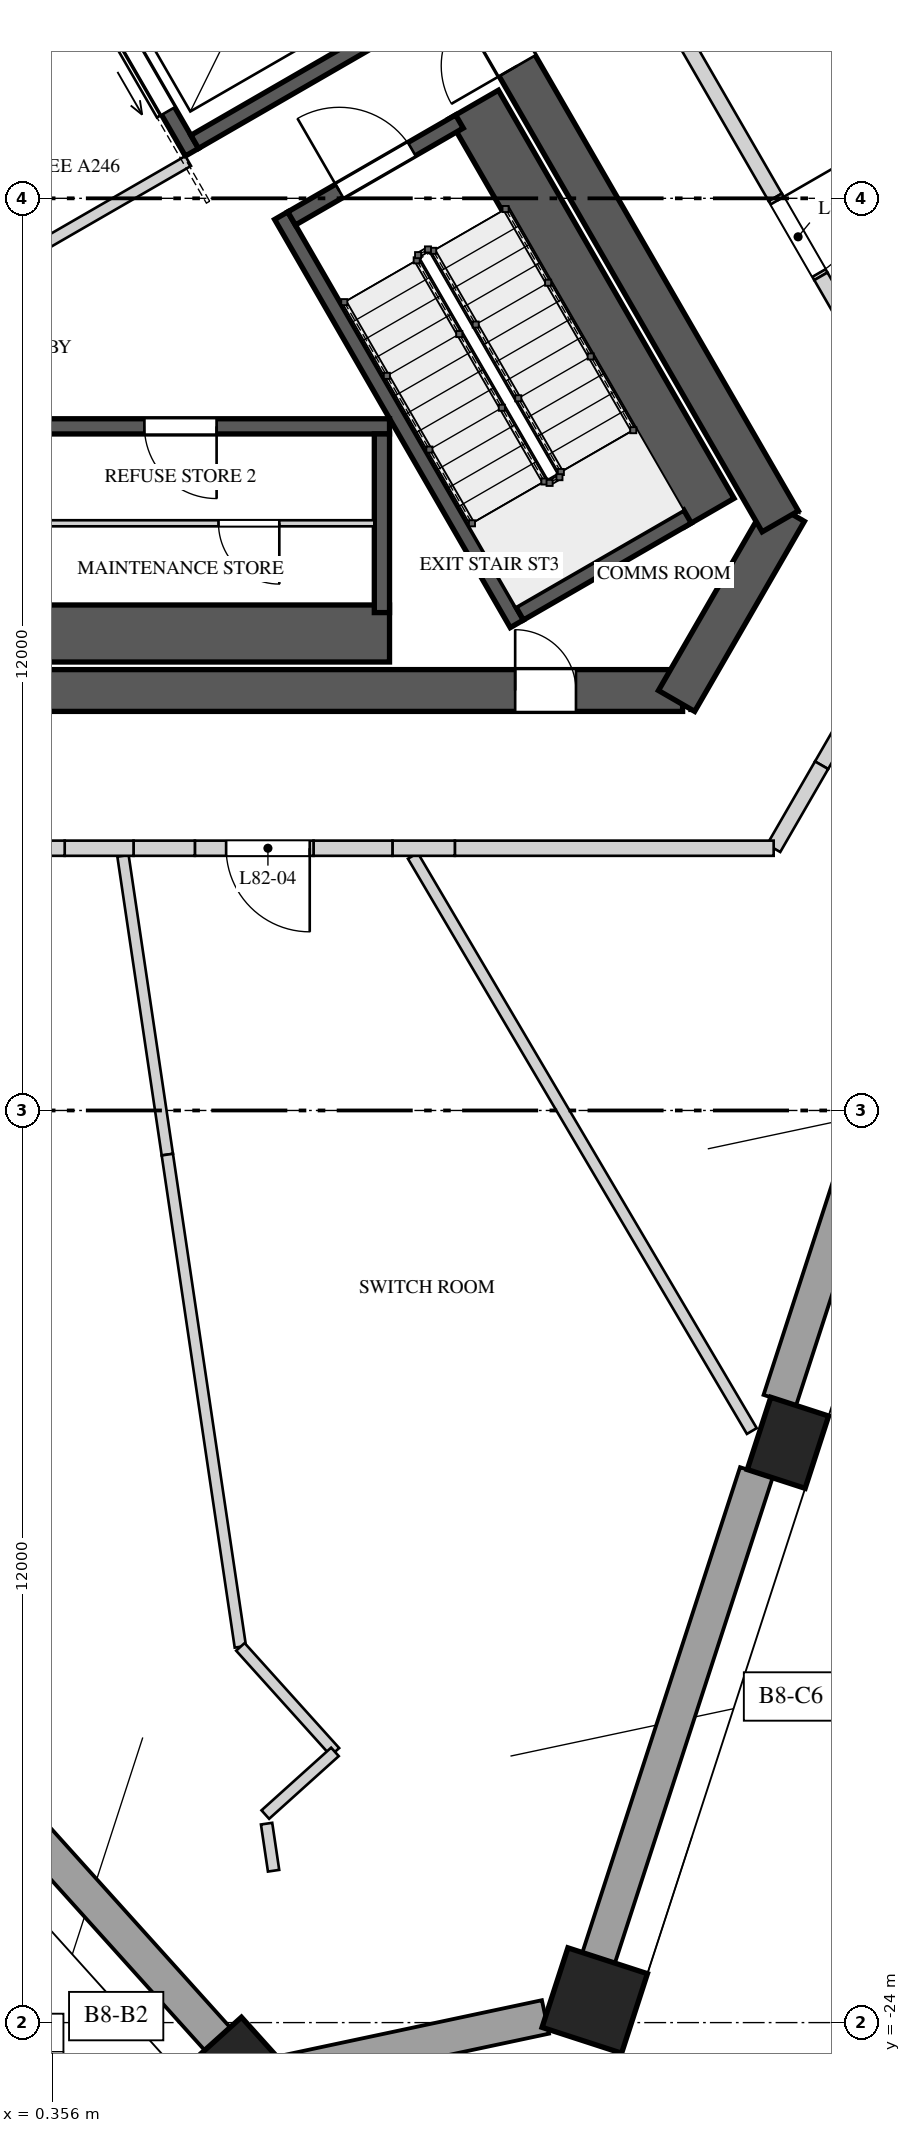
"""IFC4 building model, lengths in metres.
Left out: names, types, materials, properties, quantities, classifications, styles, units other than length and angle.
Written with IfcOpenShell. Run it as: python <this file> out.ifc"""

import sys

from ifc_helpers import new_model, si_unit, direction, frame, frame_2d, origin, origin_2d, place, context, subcontext, project, spatial, polyline, rectangle, outline, extrude, element, fill, save


model = new_model("IFC4")
c1 = context("Model", 3, precision=1e-05, world=origin(), true_north=direction((0.0, 1.0)))
c2 = subcontext(c1, "Body", "Model", "MODEL_VIEW")
j1 = project(units=[si_unit("LENGTHUNIT", "METRE"), si_unit("PLANEANGLEUNIT", "RADIAN")], contexts=[c1])
p1 = place(None, origin())
s1 = spatial("IfcSite", under=j1, at=p1, CompositionType="ELEMENT")
p2 = place(p1, origin())
s2 = spatial("IfcBuilding", under=s1, at=p2, CompositionType="ELEMENT")
p3 = place(p2, frame((0.0, 0.0, 356.9)))
s3 = spatial("IfcBuildingStorey", under=s2, at=p3, CompositionType="ELEMENT", Elevation=356.9)
p4 = place(p3, frame((-8.646, -6.475, 0.0), z_axis=(0.0, 0.0, 1.0), x_axis=(1.0, 0.0, 0.0)))
e1 = element("IfcWall", 1, at=p4, inside=s3, PredefinedType="SHEAR", context=c2, shape_type="SweptSolid", body=[
    extrude(rectangle(XDim=17.292, YDim=0.55, at=frame_2d((8.646, 0.0))), origin(), (0.0, 0.0, 1.0), 4.5),
])
p5 = place(p4, frame((6.851, 0.0, 0.0)))
e2 = element("IfcOpeningElement", 2, at=p5, cuts=e1, PredefinedType="OPENING", context=c2, shape_type="SweptSolid", body=[
    extrude(rectangle(XDim=1.0, YDim=2.4, at=frame_2d((0.5, 1.2))), frame((0.0, 0.285, 0.0), z_axis=(0.0, -1.0, 0.0), x_axis=(1.0, 0.0, 0.0)), (0.0, 0.0, 1.0), 0.57),
])
p6 = place(p4, frame((15.089, 0.0, 0.0)))
e3 = element("IfcOpeningElement", 3, at=p6, cuts=e1, PredefinedType="OPENING", context=c2, shape_type="SweptSolid", body=[
    extrude(rectangle(XDim=0.8, YDim=2.1, at=frame_2d((0.4, 1.05))), frame((0.0, 0.285, 0.0), z_axis=(0.0, -1.0, 0.0), x_axis=(1.0, 0.0, 0.0)), (0.0, 0.0, 1.0), 0.57),
])
p7 = place(p3, frame((8.566, -6.613, 0.0), z_axis=(0.0, 0.0, 1.0), x_axis=(0.499995765644, 0.866027848477, 0.0)))
e4 = element("IfcWall", 4, at=p7, inside=s3, PredefinedType="SHEAR", context=c2, shape_type="SweptSolid", body=[
    extrude(rectangle(XDim=2.887, YDim=0.55, at=frame_2d((1.443, 0.0))), origin(), (0.0, 0.0, 1.0), 4.5),
])
p8 = place(p3, frame((9.93, -4.25, 0.0), z_axis=(0.0, 0.0, 1.0), x_axis=(-0.499994590896, 0.86602852671, 0.0)))
e5 = element("IfcWall", 5, at=p8, inside=s3, PredefinedType="SHEAR", context=c2, shape_type="SweptSolid", body=[
    extrude(rectangle(XDim=17.292, YDim=0.55, at=frame_2d((8.646, 0.0))), origin(), (0.0, 0.0, 1.0), 4.5),
])
p9 = place(p8, frame((6.921, 0.0, 0.0)))
e6 = element("IfcOpeningElement", 6, at=p9, cuts=e5, PredefinedType="OPENING", context=c2, shape_type="SweptSolid", body=[
    extrude(rectangle(XDim=1.0, YDim=2.4, at=frame_2d((0.5, 1.2))), frame((0.0, 0.285, 0.0), z_axis=(0.0, -1.0, 0.0), x_axis=(1.0, 0.0, 0.0)), (0.0, 0.0, 1.0), 0.57),
])
for number, where, z_axis, x_axis in (
    (7, (2.801, -24.706, 0.0), (0.0, 0.0, 1.0), (0.669, -0.743, 0.0)),
    (8, (7.49, -23.709, 0.0), (0.0, 0.0, 1.0), (0.309, 0.951, 0.0)),
):
    element("IfcColumn", number, at=place(p3, frame(where, z_axis=z_axis, x_axis=x_axis)), inside=s3, PredefinedType="COLUMN", context=c2, shape_type="SweptSolid", body=[
        extrude(rectangle(XDim=1.1, YDim=1.1, at=origin_2d()), origin(), (0.0, 0.0, 1.0), 4.5),
    ])
p10 = place(p3, frame((10.032, -16.372, 0.0), z_axis=(0.0, 0.0, 1.0), x_axis=(0.309016994375, 0.951056516295, 0.0)))
e9 = element("IfcColumn", 9, at=p10, inside=s3, PredefinedType="COLUMN", context=c2, shape_type="SweptSolid", body=[
    extrude(rectangle(XDim=1.0, YDim=0.8, at=origin_2d()), origin(), (0.0, 0.0, 1.0), 4.5),
])
p11 = place(p3, frame((-1.966, -19.224, 0.0), z_axis=(0.0, 0.0, 1.0), x_axis=(0.66911941145, -0.743154905266, 0.0)))
e10 = element("IfcWall", 10, at=p11, inside=s3, PredefinedType="SOLIDWALL", context=c2, shape_type="SweptSolid", body=[
    extrude(rectangle(XDim=6.714, YDim=0.45, at=frame_2d((3.357, 0.0))), origin(), (0.0, 0.0, 1.0), 3.8),
])
p12 = place(p3, frame((3.481, -24.64, 0.0), z_axis=(0.0, 0.0, 1.0), x_axis=(0.978139158523, 0.207951404333, 0.0)))
e11 = element("IfcWall", 11, at=p12, inside=s3, PredefinedType="SOLIDWALL", context=c2, shape_type="SweptSolid", body=[
    extrude(rectangle(XDim=3.435, YDim=0.45, at=frame_2d((1.718, 0.0))), origin(), (0.0, 0.0, 1.0), 3.8),
])
p13 = place(p3, frame((7.541, -23.148, 0.0), z_axis=(0.0, 0.0, 1.0), x_axis=(0.309018647645, 0.951055979114, 0.0)))
e12 = element("IfcWall", 12, at=p13, inside=s3, PredefinedType="SOLIDWALL", context=c2, shape_type="SweptSolid", body=[
    extrude(rectangle(XDim=6.714, YDim=0.45, at=frame_2d((3.357, 0.0))), origin(), (0.0, 0.0, 1.0), 3.8),
])
p14 = place(p3, frame((9.925, -15.812, 0.0), z_axis=(0.0, 0.0, 1.0), x_axis=(0.309008326872, 0.951059332494, 0.0)))
e13 = element("IfcWall", 13, at=p14, inside=s3, PredefinedType="SOLIDWALL", context=c2, shape_type="SweptSolid", body=[
    extrude(rectangle(XDim=7.314, YDim=0.45, at=frame_2d((3.657, 0.0))), origin(), (0.0, 0.0, 1.0), 3.8),
])
p15 = place(p3, frame((8.998, -4.135, 0.0), z_axis=(0.0, 0.0, 1.0), x_axis=(-0.500009909098, 0.866019682689, 0.0)))
e14 = element("IfcWall", 14, at=p15, inside=s3, PredefinedType="SOLIDWALL", context=c2, shape_type="SweptSolid", body=[
    extrude(rectangle(XDim=6.2, YDim=0.75, at=frame_2d((3.1, 0.0))), origin(), (0.0, 0.0, 1.0), 4.15),
])
p16 = place(p3, frame((6.465, -5.597, 0.0), z_axis=(0.0, 0.0, 1.0), x_axis=(-0.49998037582, 0.866036733513, 0.0)))
e15 = element("IfcWall", 15, at=p16, inside=s3, PredefinedType="SOLIDWALL", context=c2, shape_type="SweptSolid", body=[
    extrude(rectangle(XDim=6.2, YDim=0.2, at=frame_2d((3.1, 0.0))), origin(), (0.0, 0.0, 1.0), 4.15),
])
p17 = place(p3, frame((6.501, -5.461, 0.0), z_axis=(0.0, 0.0, 1.0), x_axis=(0.865989465428, 0.500062241894, 0.0)))
e16 = element("IfcWall", 16, at=p17, inside=s3, PredefinedType="SOLIDWALL", context=c2, shape_type="SweptSolid", body=[
    extrude(rectangle(XDim=2.55, YDim=0.2, at=frame_2d((1.275, 0.0))), origin(), (0.0, 0.0, 1.0), 4.15),
])
p18 = place(p3, frame((3.501, -0.265, 0.0), z_axis=(0.0, 0.0, 1.0), x_axis=(0.866030925526, 0.499990435942, 0.0)))
e17 = element("IfcWall", 17, at=p18, inside=s3, PredefinedType="SOLIDWALL", context=c2, shape_type="SweptSolid", body=[
    extrude(rectangle(XDim=2.55, YDim=0.2, at=frame_2d((1.275, 0.0))), origin(), (0.0, 0.0, 1.0), 4.15),
])
p19 = place(p18, frame((0.725, 0.0, 0.0)))
e18 = element("IfcOpeningElement", 18, at=p19, cuts=e17, PredefinedType="OPENING", context=c2, shape_type="SweptSolid", body=[
    extrude(rectangle(XDim=1.1, YDim=2.4, at=frame_2d((0.55, 1.2))), frame((0.0, 0.11, 0.0), z_axis=(0.0, -1.0, 0.0), x_axis=(1.0, 0.0, 0.0)), (0.0, 0.0, 1.0), 0.22),
])
p20 = place(p3, frame((4.79, -3.0, 0.0), z_axis=(0.0, 0.0, 1.0), x_axis=(-1.0, 0.0, 0.0)))
e19 = element("IfcWall", 19, at=p20, inside=s3, PredefinedType="SOLIDWALL", context=c2, shape_type="SweptSolid", body=[
    extrude(rectangle(XDim=5.5, YDim=0.2, at=frame_2d((2.75, 0.0))), origin(), (0.0, 0.0, 1.0), 4.15),
])
p21 = place(p20, frame((2.275, 0.0, 0.0)))
e20 = element("IfcOpeningElement", 20, at=p21, cuts=e19, PredefinedType="OPENING", context=c2, shape_type="SweptSolid", body=[
    extrude(rectangle(XDim=0.95, YDim=2.4, at=frame_2d((0.475, 1.2))), frame((0.0, 0.11, 0.0), z_axis=(0.0, -1.0, 0.0), x_axis=(1.0, 0.0, 0.0)), (0.0, 0.0, 1.0), 0.22),
])
p22 = place(p3, frame((-0.71, -5.725, 0.0), z_axis=(0.0, 0.0, 1.0), x_axis=(1.0, 0.0, 0.0)))
e21 = element("IfcWall", 21, at=p22, inside=s3, PredefinedType="SOLIDWALL", context=c2, shape_type="SweptSolid", body=[
    extrude(rectangle(XDim=5.5, YDim=0.75, at=frame_2d((2.75, 0.0))), origin(), (0.0, 0.0, 1.0), 4.15),
])
p23 = place(p3, frame((4.69, -3.1, 0.0), z_axis=(0.0, 0.0, 1.0), x_axis=(0.0, -1.0, 0.0)))
e22 = element("IfcWall", 22, at=p23, inside=s3, PredefinedType="SOLIDWALL", context=c2, shape_type="SweptSolid", body=[
    extrude(rectangle(XDim=2.35, YDim=0.2, at=frame_2d((1.175, 0.0))), origin(), (0.0, 0.0, 1.0), 4.15),
])
p24 = place(p3, frame((4.59, -4.275, 0.0), z_axis=(0.0, 0.0, 1.0), x_axis=(-1.0, 0.0, 0.0)))
e23 = element("IfcWall", 23, at=p24, inside=s3, PredefinedType="PARTITIONING", context=c2, shape_type="SweptSolid", body=[
    extrude(rectangle(XDim=5.1, YDim=0.08, at=frame_2d((2.55, 0.0))), origin(), (0.0, 0.0, 1.0), 4.15),
])
p25 = place(p24, frame((1.25, 0.0, 0.0)))
e24 = element("IfcOpeningElement", 24, at=p25, cuts=e23, PredefinedType="OPENING", context=c2, shape_type="SweptSolid", body=[
    extrude(rectangle(XDim=0.8, YDim=2.1, at=frame_2d((0.4, 1.05))), frame((0.0, 0.05, 0.0), z_axis=(0.0, -1.0, 0.0), x_axis=(1.0, 0.0, 0.0)), (0.0, 0.0, 1.0), 0.1),
])
p26 = place(p3, frame((2.19, 0.606, 0.0), z_axis=(0.0, 0.0, 1.0), x_axis=(-0.500002801628, 0.866023786258, 0.0)))
e25 = element("IfcWall", 25, at=p26, inside=s3, PredefinedType="SOLIDWALL", context=c2, shape_type="SweptSolid", body=[
    extrude(rectangle(XDim=4.9, YDim=0.2, at=frame_2d((2.45, 0.0))), origin(), (0.0, 0.0, 1.0), 4.15),
])
p27 = place(p26, frame((0.625, 0.0, 0.0)))
e26 = element("IfcOpeningElement", 26, at=p27, cuts=e25, PredefinedType="OPENING", context=c2, shape_type="SweptSolid", body=[
    extrude(rectangle(XDim=1.3, YDim=2.1, at=frame_2d((0.65, 1.05))), frame((0.0, 0.11, 0.0), z_axis=(0.0, -1.0, 0.0), x_axis=(1.0, 0.0, 0.0)), (0.0, 0.0, 1.0), 0.22),
])
p28 = place(p26, frame((2.975, 0.0, 0.0)))
e27 = element("IfcOpeningElement", 27, at=p28, cuts=e25, PredefinedType="OPENING", context=c2, shape_type="SweptSolid", body=[
    extrude(rectangle(XDim=1.3, YDim=2.1, at=frame_2d((0.65, 1.05))), frame((0.0, 0.11, 0.0), z_axis=(0.0, -1.0, 0.0), x_axis=(1.0, 0.0, 0.0)), (0.0, 0.0, 1.0), 0.22),
])
p29 = place(p3, frame((2.227, 0.743, 0.0), z_axis=(0.0, 0.0, 1.0), x_axis=(0.866035871367, 0.499981869177, 0.0)))
e28 = element("IfcWall", 28, at=p29, inside=s3, PredefinedType="SOLIDWALL", context=c2, shape_type="SweptSolid", body=[
    extrude(rectangle(XDim=3.15, YDim=0.2, at=frame_2d((1.575, 0.0))), origin(), (0.0, 0.0, 1.0), 4.15),
])
p30 = place(p3, frame((-0.717, -1.159, 0.0), z_axis=(0.0, 0.0, 1.0), x_axis=(0.866008176907, 0.50002983664, 0.0)))
e29 = element("IfcWall", 29, at=p30, inside=s3, PredefinedType="PARTITIONING", context=c2, shape_type="SweptSolid", body=[
    extrude(rectangle(XDim=3.3, YDim=0.15, at=frame_2d((1.65, 0.0))), origin(), (0.0, 0.0, 1.0), 4.15),
])
p31 = place(p3, frame((1.283, -8.65, 0.0), z_axis=(0.0, 0.0, 1.0), x_axis=(0.146778002289, -0.98916945871, 0.0)))
e30 = element("IfcWall", 30, at=p31, inside=s3, PredefinedType="PARTITIONING", context=c2, shape_type="SweptSolid", body=[
    extrude(rectangle(XDim=3.974, YDim=0.15, at=frame_2d((1.987, 0.0))), origin(), (0.0, 0.0, 1.0), 3.05),
])
p32 = place(p3, frame((1.867, -12.581, 0.0), z_axis=(0.0, 0.0, 1.0), x_axis=(0.146760871061, -0.989172000577, 0.0)))
e31 = element("IfcWall", 31, at=p32, inside=s3, PredefinedType="PARTITIONING", context=c2, shape_type="SweptSolid", body=[
    extrude(rectangle(XDim=6.546, YDim=0.15, at=frame_2d((3.273, 0.0))), origin(), (0.0, 0.0, 1.0), 4.15),
])
p33 = place(p3, frame((2.828, -19.057, 0.0), z_axis=(0.0, 0.0, 1.0), x_axis=(0.66910257544, -0.743170063673, 0.0)))
e32 = element("IfcWall", 32, at=p33, inside=s3, PredefinedType="PARTITIONING", context=c2, shape_type="SweptSolid", body=[
    extrude(rectangle(XDim=1.859, YDim=0.15, at=frame_2d((0.93, 0.0))), origin(), (0.0, 0.0, 1.0), 4.15),
])
p34 = place(p3, frame((3.173, -21.383, 0.0), z_axis=(0.0, 0.0, 1.0), x_axis=(0.146986678694, -0.989138471745, 0.0)))
e33 = element("IfcWall", 33, at=p34, inside=s3, PredefinedType="PARTITIONING", context=c2, shape_type="SweptSolid", body=[
    extrude(rectangle(XDim=0.626, YDim=0.15, at=frame_2d((0.313, 0.0))), origin(), (0.0, 0.0, 1.0), 4.15),
])
p35 = place(p3, frame((4.072, -20.438, 0.0), z_axis=(0.0, 0.0, 1.0), x_axis=(-0.74317594648, -0.669096041367, 0.0)))
e34 = element("IfcWall", 34, at=p35, inside=s3, PredefinedType="PARTITIONING", context=c2, shape_type="SweptSolid", body=[
    extrude(rectangle(XDim=1.233, YDim=0.15, at=frame_2d((0.616, 0.0))), origin(), (0.0, 0.0, 1.0), 4.15),
])
p36 = place(p3, frame((5.097, -8.65, 0.0), z_axis=(0.0, 0.0, 1.0), x_axis=(0.507661360347, -0.861556697618, 0.0)))
e35 = element("IfcWall", 35, at=p36, inside=s3, PredefinedType="PARTITIONING", context=c2, shape_type="SweptSolid", body=[
    extrude(rectangle(XDim=8.783, YDim=0.15, at=frame_2d((4.392, 0.0))), origin(), (0.0, 0.0, 1.0), 3.45),
])
p37 = place(p3, frame((10.825, -6.851, 0.0), z_axis=(0.0, 0.0, 1.0), x_axis=(-0.500144223137, -0.865942120504, 0.0)))
e36 = element("IfcWall", 36, at=p37, inside=s3, PredefinedType="SOLIDWALL", context=c2, shape_type="SweptSolid", body=[
    extrude(rectangle(XDim=0.701, YDim=0.2, at=frame_2d((0.351, 0.0))), origin(), (0.0, 0.0, 1.0), 3.45),
])
p38 = place(p3, frame((10.474, -7.458, 0.0), z_axis=(0.0, 0.0, 1.0), x_axis=(-0.499929168788, -0.866066294342, 0.0)))
e37 = element("IfcWall", 37, at=p38, inside=s3, PredefinedType="SOLIDWALL", context=c2, shape_type="SweptSolid", body=[
    extrude(rectangle(XDim=1.261, YDim=0.2, at=frame_2d((0.63, 0.0))), origin(), (0.0, 0.0, 1.0), 4.15),
])
p39 = place(p3, frame((9.844, -8.55, 0.0), z_axis=(0.0, 0.0, 1.0), x_axis=(-1.0, 0.0, 0.0)))
e38 = element("IfcWall", 38, at=p39, inside=s3, PredefinedType="SOLIDWALL", context=c2, shape_type="SweptSolid", body=[
    extrude(rectangle(XDim=4.194, YDim=0.2, at=frame_2d((2.097, 0.0))), origin(), (0.0, 0.0, 1.0), 4.15),
])
p40 = place(p3, frame((5.649, -8.55, 0.0), z_axis=(0.0, 0.0, 1.0), x_axis=(-1.0, 0.0, 0.0)))
e39 = element("IfcWall", 39, at=p40, inside=s3, PredefinedType="SOLIDWALL", context=c2, shape_type="SweptSolid", body=[
    extrude(rectangle(XDim=0.821, YDim=0.2, at=frame_2d((0.411, 0.0))), origin(), (0.0, 0.0, 1.0), 3.45),
])
p41 = place(p3, frame((4.828, -8.55, 0.0), z_axis=(0.0, 0.0, 1.0), x_axis=(-1.0, 0.0, 0.0)))
e40 = element("IfcWall", 40, at=p41, inside=s3, PredefinedType="SOLIDWALL", context=c2, shape_type="SweptSolid", body=[
    extrude(rectangle(XDim=1.038, YDim=0.2, at=frame_2d((0.519, 0.0))), origin(), (0.0, 0.0, 1.0), 4.15),
])
p42 = place(p3, frame((3.79, -8.55, 0.0), z_axis=(0.0, 0.0, 1.0), x_axis=(-1.0, 0.0, 0.0)))
e41 = element("IfcWall", 41, at=p42, inside=s3, PredefinedType="SOLIDWALL", context=c2, shape_type="SweptSolid", body=[
    extrude(outline(polyline([(0.0, 0.0), (1.561, 0.0), (1.561, 3.05), (0.617, 3.05), (0.617, 4.15), (0.0, 4.15), (0.0, 0.0)])), frame((0.0, 0.1, 0.0), z_axis=(0.0, -1.0, 0.0), x_axis=(1.0, 0.0, 0.0)), (0.0, 0.0, 1.0), 0.2),
])
p43 = place(p42, frame((0.05, 0.0, 0.0)))
e42 = element("IfcOpeningElement", 42, at=p43, cuts=e41, PredefinedType="OPENING", context=c2, shape_type="SweptSolid", body=[
    extrude(rectangle(XDim=1.1, YDim=2.4, at=frame_2d((0.55, 1.2))), frame((0.0, 0.11, 0.0), z_axis=(0.0, -1.0, 0.0), x_axis=(1.0, 0.0, 0.0)), (0.0, 0.0, 1.0), 0.22),
])
p44 = place(p3, frame((2.229, -8.55, 0.0), z_axis=(0.0, 0.0, 1.0), x_axis=(-1.0, 0.0, 0.0)))
e43 = element("IfcWall", 43, at=p44, inside=s3, PredefinedType="SOLIDWALL", context=c2, shape_type="SweptSolid", body=[
    extrude(rectangle(XDim=0.807, YDim=0.2, at=frame_2d((0.403, 0.0))), origin(), (0.0, 0.0, 1.0), 4.15),
])
p45 = place(p3, frame((1.422, -8.55, 0.0), z_axis=(0.0, 0.0, 1.0), x_axis=(-1.0, 0.0, 0.0)))
e44 = element("IfcWall", 44, at=p45, inside=s3, PredefinedType="SOLIDWALL", context=c2, shape_type="SweptSolid", body=[
    extrude(rectangle(XDim=0.906, YDim=0.2, at=frame_2d((0.453, 0.0))), origin(), (0.0, 0.0, 1.0), 3.05),
])
p46 = place(p3, frame((0.517, -8.55, 0.0), z_axis=(0.0, 0.0, 1.0), x_axis=(-1.0, 0.0, 0.0)))
e45 = element("IfcWall", 45, at=p46, inside=s3, PredefinedType="SOLIDWALL", context=c2, shape_type="SweptSolid", body=[
    extrude(rectangle(XDim=1.238, YDim=0.2, at=frame_2d((0.619, 0.0))), origin(), (0.0, 0.0, 1.0), 4.15),
])
p47 = place(p3, frame((8.169, 2.951, 0.0), z_axis=(0.0, 0.0, 1.0), x_axis=(0.499955030392, -0.866051365443, 0.0)))
e46 = element("IfcWall", 46, at=p47, inside=s3, PredefinedType="SOLIDWALL", context=c2, shape_type="SweptSolid", body=[
    extrude(rectangle(XDim=3.392, YDim=0.2, at=frame_2d((1.696, 0.0))), origin(), (0.0, 0.0, 1.0), 4.15),
])
p48 = place(p3, frame((9.865, 0.013, 0.0), z_axis=(0.0, 0.0, 1.0), x_axis=(0.50012165622, -0.865955154139, 0.0)))
e47 = element("IfcWall", 47, at=p48, inside=s3, PredefinedType="SOLIDWALL", context=c2, shape_type="SweptSolid", body=[
    extrude(outline(polyline([(0.0, 0.0), (1.2, 0.0), (1.2, 4.15), (0.857, 4.15), (0.857, 3.45), (0.0, 3.45), (0.0, 0.0)])), frame((0.0, 0.1, 0.0), z_axis=(0.0, -1.0, 0.0), x_axis=(1.0, 0.0, 0.0)), (0.0, 0.0, 1.0), 0.2),
])
p49 = place(p48, frame((0.05, 0.0, 0.0)))
e48 = element("IfcOpeningElement", 48, at=p49, cuts=e47, PredefinedType="OPENING", context=c2, shape_type="SweptSolid", body=[
    extrude(rectangle(XDim=1.1, YDim=2.4, at=frame_2d((0.55, 1.2))), frame((0.0, 0.11, 0.0), z_axis=(0.0, -1.0, 0.0), x_axis=(1.0, 0.0, 0.0)), (0.0, 0.0, 1.0), 0.22),
])
p50 = place(p3, frame((10.465, -1.026, 0.0), z_axis=(0.0, 0.0, 1.0), x_axis=(0.499976014784, -0.866039251212, 0.0)))
e49 = element("IfcWall", 49, at=p50, inside=s3, PredefinedType="SOLIDWALL", context=c2, shape_type="SweptSolid", body=[
    extrude(rectangle(XDim=3.723, YDim=0.2, at=frame_2d((1.861, 0.0))), origin(), (0.0, 0.0, 1.0), 4.15),
])
p51 = place(p19, origin())
e50 = element("IfcDoor", 50, at=p51, inside=s3, OperationType="SINGLE_SWING_RIGHT", PredefinedType="DOOR", context=c2, shape_type="SweptSolid", body=[
    extrude(rectangle(XDim=1.1, YDim=2.4, at=frame_2d((0.55, 1.2))), frame((0.0, 0.025, 0.0), z_axis=(0.0, -1.0, 0.0), x_axis=(1.0, 0.0, 0.0)), (0.0, 0.0, 1.0), 0.05),
])
fill(e18, e50)
p52 = place(p21, origin())
e51 = element("IfcDoor", 51, at=p52, inside=s3, OperationType="SINGLE_SWING_LEFT", PredefinedType="DOOR", context=c2, shape_type="SweptSolid", body=[
    extrude(rectangle(XDim=0.95, YDim=2.4, at=frame_2d((0.475, 1.2))), frame((0.0, 0.025, 0.0), z_axis=(0.0, -1.0, 0.0), x_axis=(1.0, 0.0, 0.0)), (0.0, 0.0, 1.0), 0.05),
])
fill(e20, e51)
p53 = place(p25, origin())
e52 = element("IfcDoor", 52, at=p53, inside=s3, OperationType="SINGLE_SWING_RIGHT", PredefinedType="DOOR", context=c2, shape_type="SweptSolid", body=[
    extrude(rectangle(XDim=0.8, YDim=2.1, at=frame_2d((0.4, 1.05))), frame((0.0, 0.025, 0.0), z_axis=(0.0, -1.0, 0.0), x_axis=(1.0, 0.0, 0.0)), (0.0, 0.0, 1.0), 0.05),
])
fill(e24, e52)
p54 = place(p27, origin())
e53 = element("IfcDoor", 53, at=p54, inside=s3, OperationType="SLIDING_TO_LEFT", PredefinedType="DOOR", context=c2, shape_type="SweptSolid", body=[
    extrude(rectangle(XDim=1.3, YDim=2.1, at=frame_2d((0.65, 1.05))), frame((0.0, 0.025, 0.0), z_axis=(0.0, -1.0, 0.0), x_axis=(1.0, 0.0, 0.0)), (0.0, 0.0, 1.0), 0.05),
])
fill(e26, e53)
p55 = place(p9, origin())
e54 = element("IfcDoor", 54, at=p55, inside=s3, OperationType="SINGLE_SWING_RIGHT", PredefinedType="DOOR", context=c2, shape_type="SweptSolid", body=[
    extrude(rectangle(XDim=1.0, YDim=2.4, at=frame_2d((0.5, 1.2))), frame((0.0, 0.025, 0.0), z_axis=(0.0, -1.0, 0.0), x_axis=(1.0, 0.0, 0.0)), (0.0, 0.0, 1.0), 0.05),
])
fill(e6, e54)
p56 = place(p6, origin())
e55 = element("IfcDoor", 55, at=p56, inside=s3, OperationType="SINGLE_SWING_RIGHT", PredefinedType="DOOR", context=c2, shape_type="SweptSolid", body=[
    extrude(rectangle(XDim=0.8, YDim=2.1, at=frame_2d((0.4, 1.05))), frame((0.0, 0.025, 0.0), z_axis=(0.0, -1.0, 0.0), x_axis=(1.0, 0.0, 0.0)), (0.0, 0.0, 1.0), 0.05),
])
fill(e3, e55)
p57 = place(p43, origin())
e56 = element("IfcDoor", 56, at=p57, inside=s3, OperationType="SINGLE_SWING_RIGHT", PredefinedType="DOOR", context=c2, shape_type="SweptSolid", body=[
    extrude(rectangle(XDim=1.1, YDim=2.4, at=frame_2d((0.55, 1.2))), frame((0.0, 0.025, 0.0), z_axis=(0.0, -1.0, 0.0), x_axis=(1.0, 0.0, 0.0)), (0.0, 0.0, 1.0), 0.05),
])
fill(e42, e56)
p58 = place(p49, origin())
e57 = element("IfcDoor", 57, at=p58, inside=s3, OperationType="SINGLE_SWING_LEFT", PredefinedType="DOOR", context=c2, shape_type="SweptSolid", body=[
    extrude(rectangle(XDim=1.1, YDim=2.4, at=frame_2d((0.55, 1.2))), frame((0.0, 0.025, 0.0), z_axis=(0.0, -1.0, 0.0), x_axis=(1.0, 0.0, 0.0)), (0.0, 0.0, 1.0), 0.05),
])
fill(e48, e57)
save(model, sys.argv[1])
